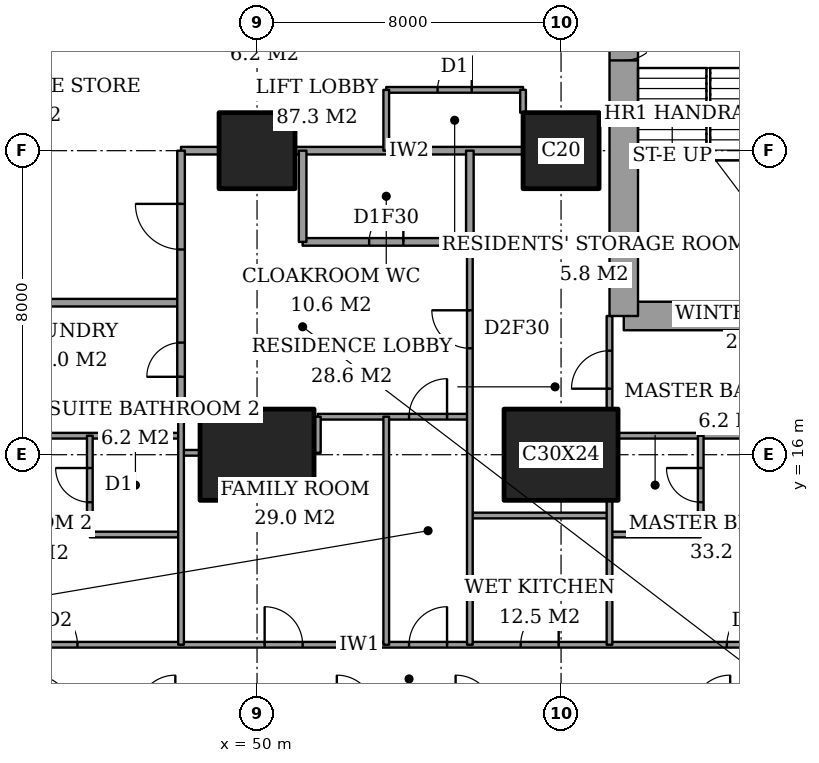
"""IFC4 building model, lengths in metres.
Left out: names, types, materials, properties, quantities, classifications, styles, units other than length and angle.
Written with IfcOpenShell. Run it as: python <this file> out.ifc"""

import sys

from ifc_helpers import new_model, si_unit, direction, frame, frame_2d, origin, origin_2d, place, context, subcontext, project, spatial, rectangle, extrude, element, fill, save


model = new_model("IFC4")
c1 = context("Model", 3, precision=1e-05, world=origin(), true_north=direction((0.0, 1.0)))
c2 = subcontext(c1, "Body", "Model", "MODEL_VIEW")
j1 = project(units=[si_unit("LENGTHUNIT", "METRE"), si_unit("PLANEANGLEUNIT", "RADIAN")], contexts=[c1])
p1 = place(None, origin())
s1 = spatial("IfcSite", under=j1, at=p1, CompositionType="ELEMENT")
p2 = place(p1, origin())
s2 = spatial("IfcBuilding", under=s1, at=p2, CompositionType="ELEMENT")
p3 = place(p2, frame((0.0, 0.0, 117.8)))
s3 = spatial("IfcBuildingStorey", under=s2, at=p3, CompositionType="ELEMENT", Elevation=117.8)
p4 = place(p3, frame((50.0, 16.0, 0.0), z_axis=(0.0, 0.0, 1.0), x_axis=(1.0, 0.0, 0.0)))
e1 = element("IfcColumn", 1, at=p4, inside=s3, PredefinedType="COLUMN", context=c2, shape_type="SweptSolid", body=[
    extrude(rectangle(XDim=3.0, YDim=2.4, at=origin_2d()), origin(), (0.0, 0.0, 1.0), 3.6),
])
p5 = place(p3, frame((50.0, 24.0, 0.0), z_axis=(0.0, 0.0, 1.0), x_axis=(1.0, 0.0, 0.0)))
e2 = element("IfcColumn", 2, at=p5, inside=s3, PredefinedType="COLUMN", context=c2, shape_type="SweptSolid", body=[
    extrude(rectangle(XDim=2.0, YDim=2.0, at=origin_2d()), origin(), (0.0, 0.0, 1.0), 3.6),
])
p6 = place(p3, frame((58.0, 16.0, 0.0), z_axis=(0.0, 0.0, 1.0), x_axis=(1.0, 0.0, 0.0)))
e3 = element("IfcColumn", 3, at=p6, inside=s3, PredefinedType="COLUMN", context=c2, shape_type="SweptSolid", body=[
    extrude(rectangle(XDim=3.0, YDim=2.4, at=origin_2d()), origin(), (0.0, 0.0, 1.0), 3.6),
])
p7 = place(p3, frame((58.0, 24.0, 0.0), z_axis=(0.0, 0.0, 1.0), x_axis=(1.0, 0.0, 0.0)))
e4 = element("IfcColumn", 4, at=p7, inside=s3, PredefinedType="COLUMN", context=c2, shape_type="SweptSolid", body=[
    extrude(rectangle(XDim=2.0, YDim=2.0, at=origin_2d()), origin(), (0.0, 0.0, 1.0), 3.6),
])
p8 = place(p3, frame((59.65, 19.65, 0.0), z_axis=(0.0, 0.0, 1.0), x_axis=(1.0, 0.0, 0.0)))
e5 = element("IfcWall", 5, at=p8, inside=s3, PredefinedType="SHEAR", context=c2, shape_type="SweptSolid", body=[
    extrude(rectangle(XDim=4.45, YDim=0.75, at=frame_2d((2.225, 0.0))), origin(), (0.0, 0.0, 1.0), 3.6),
])
p9 = place(p3, frame((59.65, 28.35, 0.0), z_axis=(0.0, 0.0, 1.0), x_axis=(0.0, -1.0, 0.0)))
e6 = element("IfcWall", 6, at=p9, inside=s3, PredefinedType="SHEAR", context=c2, shape_type="SweptSolid", body=[
    extrude(rectangle(XDim=8.7, YDim=0.75, at=frame_2d((4.35, 0.0))), origin(), (0.0, 0.0, 1.0), 3.6),
])
p10 = place(p9, frame((0.975, 0.0, 0.0)))
e7 = element("IfcOpeningElement", 7, at=p10, cuts=e6, PredefinedType="OPENING", context=c2, shape_type="SweptSolid", body=[
    extrude(rectangle(XDim=1.0, YDim=2.1, at=frame_2d((0.5, 1.05))), frame((0.0, 0.385, 0.0), z_axis=(0.0, -1.0, 0.0), x_axis=(1.0, 0.0, 0.0)), (0.0, 0.0, 1.0), 0.77),
])
p11 = place(p3, frame((41.439, 11.0, 0.0), z_axis=(0.0, 0.0, 1.0), x_axis=(1.0, 0.0, 0.0)))
e8 = element("IfcWall", 8, at=p11, inside=s3, PredefinedType="PARTITIONING", context=c2, shape_type="SweptSolid", body=[
    extrude(rectangle(XDim=25.011, YDim=0.15, at=frame_2d((12.505, 0.0))), origin(), (0.0, 0.0, 1.0), 3.35),
])
p12 = place(p11, frame((12.561, 0.0, 0.0)))
e9 = element("IfcOpeningElement", 9, at=p12, cuts=e8, PredefinedType="OPENING", context=c2, shape_type="SweptSolid", body=[
    extrude(rectangle(XDim=1.0, YDim=2.1, at=frame_2d((0.5, 1.05))), frame((0.0, 0.085, 0.0), z_axis=(0.0, -1.0, 0.0), x_axis=(1.0, 0.0, 0.0)), (0.0, 0.0, 1.0), 0.17),
])
p13 = place(p11, frame((20.924, 0.0, 0.0)))
e10 = element("IfcOpeningElement", 10, at=p13, cuts=e8, PredefinedType="OPENING", context=c2, shape_type="SweptSolid", body=[
    extrude(rectangle(XDim=1.0, YDim=2.1, at=frame_2d((0.5, 1.05))), frame((0.0, 0.085, 0.0), z_axis=(0.0, -1.0, 0.0), x_axis=(1.0, 0.0, 0.0)), (0.0, 0.0, 1.0), 0.17),
])
p14 = place(p11, frame((15.499, 0.0, 0.0)))
e11 = element("IfcOpeningElement", 11, at=p14, cuts=e8, PredefinedType="OPENING", context=c2, shape_type="SweptSolid", body=[
    extrude(rectangle(XDim=1.0, YDim=2.1, at=frame_2d((0.5, 1.05))), frame((0.0, 0.085, 0.0), z_axis=(0.0, -1.0, 0.0), x_axis=(1.0, 0.0, 0.0)), (0.0, 0.0, 1.0), 0.17),
])
p15 = place(p11, frame((8.761, 0.0, 0.0)))
e12 = element("IfcOpeningElement", 12, at=p15, cuts=e8, PredefinedType="OPENING", context=c2, shape_type="SweptSolid", body=[
    extrude(rectangle(XDim=1.0, YDim=2.1, at=frame_2d((0.5, 1.05))), frame((0.0, 0.085, 0.0), z_axis=(0.0, -1.0, 0.0), x_axis=(1.0, 0.0, 0.0)), (0.0, 0.0, 1.0), 0.17),
])
p16 = place(p11, frame((2.836, 0.0, 0.0)))
e13 = element("IfcOpeningElement", 13, at=p16, cuts=e8, PredefinedType="OPENING", context=c2, shape_type="SweptSolid", body=[
    extrude(rectangle(XDim=1.0, YDim=2.1, at=frame_2d((0.5, 1.05))), frame((0.0, 0.085, 0.0), z_axis=(0.0, -1.0, 0.0), x_axis=(1.0, 0.0, 0.0)), (0.0, 0.0, 1.0), 0.17),
])
p17 = place(p3, frame((45.6, 13.9, 0.0), z_axis=(0.0, 0.0, 1.0), x_axis=(1.0, 0.0, 0.0)))
e14 = element("IfcWall", 14, at=p17, inside=s3, PredefinedType="PARTITIONING", context=c2, shape_type="SweptSolid", body=[
    extrude(rectangle(XDim=2.4, YDim=0.15, at=frame_2d((1.2, 0.0))), origin(), (0.0, 0.0, 1.0), 3.35),
])
p18 = place(p3, frame((59.275, 13.9, 0.0), z_axis=(0.0, 0.0, 1.0), x_axis=(1.0, 0.0, 0.0)))
e15 = element("IfcWall", 15, at=p18, inside=s3, PredefinedType="PARTITIONING", context=c2, shape_type="SweptSolid", body=[
    extrude(rectangle(XDim=2.4, YDim=0.15, at=frame_2d((1.2, 0.0))), origin(), (0.0, 0.0, 1.0), 3.35),
])
p19 = place(p3, frame((55.6, 14.4, 0.0), z_axis=(0.0, 0.0, 1.0), x_axis=(1.0, 0.0, 0.0)))
e16 = element("IfcWall", 16, at=p19, inside=s3, PredefinedType="PARTITIONING", context=c2, shape_type="SweptSolid", body=[
    extrude(rectangle(XDim=3.675, YDim=0.15, at=frame_2d((1.837, 0.0))), origin(), (0.0, 0.0, 1.0), 3.35),
])
p20 = place(p3, frame((48.0, 16.05, 0.0), z_axis=(0.0, 0.0, 1.0), x_axis=(1.0, 0.0, 0.0)))
e17 = element("IfcWall", 17, at=p20, inside=s3, PredefinedType="PARTITIONING", context=c2, shape_type="SweptSolid", body=[
    extrude(rectangle(XDim=0.5, YDim=0.15, at=frame_2d((0.25, 0.0))), origin(), (0.0, 0.0, 1.0), 2.634),
])
p21 = place(p3, frame((42.0, 16.5, 0.0), z_axis=(0.0, 0.0, 1.0), x_axis=(1.0, 0.0, 0.0)))
e18 = element("IfcWall", 18, at=p21, inside=s3, PredefinedType="PARTITIONING", context=c2, shape_type="SweptSolid", body=[
    extrude(rectangle(XDim=6.0, YDim=0.15, at=frame_2d((3.0, 0.0))), origin(), (0.0, 0.0, 1.0), 3.35),
])
p22 = place(p3, frame((59.5, 16.5, 0.0), z_axis=(0.0, 0.0, 1.0), x_axis=(1.0, 0.0, 0.0)))
e19 = element("IfcWall", 19, at=p22, inside=s3, PredefinedType="PARTITIONING", context=c2, shape_type="SweptSolid", body=[
    extrude(rectangle(XDim=5.15, YDim=0.15, at=frame_2d((2.575, 0.0))), origin(), (0.0, 0.0, 1.0), 3.35),
])
p23 = place(p3, frame((51.6, 17.0, 0.0), z_axis=(0.0, 0.0, 1.0), x_axis=(1.0, 0.0, 0.0)))
e20 = element("IfcWall", 20, at=p23, inside=s3, PredefinedType="PARTITIONING", context=c2, shape_type="SweptSolid", body=[
    extrude(rectangle(XDim=4.0, YDim=0.15, at=frame_2d((2.0, 0.0))), origin(), (0.0, 0.0, 1.0), 3.35),
])
p24 = place(p23, frame((2.4, 0.0, 0.0)))
e21 = element("IfcOpeningElement", 21, at=p24, cuts=e20, PredefinedType="OPENING", context=c2, shape_type="SweptSolid", body=[
    extrude(rectangle(XDim=1.0, YDim=2.1, at=frame_2d((0.5, 1.05))), frame((0.0, 0.085, 0.0), z_axis=(0.0, -1.0, 0.0), x_axis=(1.0, 0.0, 0.0)), (0.0, 0.0, 1.0), 0.17),
])
p25 = place(p3, frame((42.0, 20.0, 0.0), z_axis=(0.0, 0.0, 1.0), x_axis=(1.0, 0.0, 0.0)))
e22 = element("IfcWall", 22, at=p25, inside=s3, PredefinedType="PARTITIONING", context=c2, shape_type="SweptSolid", body=[
    extrude(rectangle(XDim=6.0, YDim=0.2, at=frame_2d((3.0, 0.0))), origin(), (0.0, 0.0, 1.0), 3.35),
])
p26 = place(p3, frame((51.2, 21.6, 0.0), z_axis=(0.0, 0.0, 1.0), x_axis=(1.0, 0.0, 0.0)))
e23 = element("IfcWall", 23, at=p26, inside=s3, PredefinedType="PARTITIONING", context=c2, shape_type="SweptSolid", body=[
    extrude(rectangle(XDim=4.4, YDim=0.2, at=frame_2d((2.2, 0.0))), origin(), (0.0, 0.0, 1.0), 3.35),
])
p27 = place(p26, frame((1.75, 0.0, 0.0)))
e24 = element("IfcOpeningElement", 24, at=p27, cuts=e23, PredefinedType="OPENING", context=c2, shape_type="SweptSolid", body=[
    extrude(rectangle(XDim=0.9, YDim=2.1, at=frame_2d((0.45, 1.05))), frame((0.0, 0.11, 0.0), z_axis=(0.0, -1.0, 0.0), x_axis=(1.0, 0.0, 0.0)), (0.0, 0.0, 1.0), 0.22),
])
p28 = place(p3, frame((48.0, 24.0, 0.0), z_axis=(0.0, 0.0, 1.0), x_axis=(1.0, 0.0, 0.0)))
e25 = element("IfcWall", 25, at=p28, inside=s3, PredefinedType="PARTITIONING", context=c2, shape_type="SweptSolid", body=[
    extrude(rectangle(XDim=1.0, YDim=0.2, at=frame_2d((0.5, 0.0))), origin(), (0.0, 0.0, 1.0), 3.35),
])
p29 = place(p3, frame((51.0, 24.0, 0.0), z_axis=(0.0, 0.0, 1.0), x_axis=(1.0, 0.0, 0.0)))
e26 = element("IfcWall", 26, at=p29, inside=s3, PredefinedType="PARTITIONING", context=c2, shape_type="SweptSolid", body=[
    extrude(rectangle(XDim=6.0, YDim=0.2, at=frame_2d((3.0, 0.0))), origin(), (0.0, 0.0, 1.0), 3.35),
])
p30 = place(p3, frame((53.4, 25.6, 0.0), z_axis=(0.0, 0.0, 1.0), x_axis=(1.0, 0.0, 0.0)))
e27 = element("IfcWall", 27, at=p30, inside=s3, PredefinedType="PARTITIONING", context=c2, shape_type="SweptSolid", body=[
    extrude(rectangle(XDim=3.6, YDim=0.15, at=frame_2d((1.8, 0.0))), origin(), (0.0, 0.0, 1.0), 3.35),
])
p31 = place(p30, frame((1.35, 0.0, 0.0)))
e28 = element("IfcOpeningElement", 28, at=p31, cuts=e27, PredefinedType="OPENING", context=c2, shape_type="SweptSolid", body=[
    extrude(rectangle(XDim=0.9, YDim=2.1, at=frame_2d((0.45, 1.05))), frame((0.0, 0.085, 0.0), z_axis=(0.0, -1.0, 0.0), x_axis=(1.0, 0.0, 0.0)), (0.0, 0.0, 1.0), 0.17),
])
p32 = place(p3, frame((45.6, 13.9, 0.0), z_axis=(0.0, 0.0, 1.0), x_axis=(0.0, 1.0, 0.0)))
e29 = element("IfcWall", 29, at=p32, inside=s3, PredefinedType="PARTITIONING", context=c2, shape_type="SweptSolid", body=[
    extrude(rectangle(XDim=2.6, YDim=0.15, at=frame_2d((1.3, 0.0))), origin(), (0.0, 0.0, 1.0), 3.35),
])
p33 = place(p32, frame((0.85, 0.0, 0.0)))
e30 = element("IfcOpeningElement", 30, at=p33, cuts=e29, PredefinedType="OPENING", context=c2, shape_type="SweptSolid", body=[
    extrude(rectangle(XDim=0.9, YDim=2.1, at=frame_2d((0.45, 1.05))), frame((0.0, 0.085, 0.0), z_axis=(0.0, -1.0, 0.0), x_axis=(1.0, 0.0, 0.0)), (0.0, 0.0, 1.0), 0.17),
])
p34 = place(p3, frame((48.0, 17.0, 0.0), z_axis=(0.0, 0.0, 1.0), x_axis=(0.0, 1.0, 0.0)))
e31 = element("IfcWall", 31, at=p34, inside=s3, PredefinedType="PARTITIONING", context=c2, shape_type="SweptSolid", body=[
    extrude(rectangle(XDim=7.0, YDim=0.2, at=frame_2d((3.5, 0.0))), origin(), (0.0, 0.0, 1.0), 3.35),
])
p35 = place(p34, frame((4.4, 0.0, 0.0)))
e32 = element("IfcOpeningElement", 32, at=p35, cuts=e31, PredefinedType="OPENING", context=c2, shape_type="SweptSolid", body=[
    extrude(rectangle(XDim=1.2, YDim=2.4, at=frame_2d((0.6, 1.2))), frame((0.0, 0.11, 0.0), z_axis=(0.0, -1.0, 0.0), x_axis=(1.0, 0.0, 0.0)), (0.0, 0.0, 1.0), 0.22),
])
p36 = place(p34, frame((1.05, 0.0, 0.0)))
e33 = element("IfcOpeningElement", 33, at=p36, cuts=e31, PredefinedType="OPENING", context=c2, shape_type="SweptSolid", body=[
    extrude(rectangle(XDim=0.9, YDim=2.1, at=frame_2d((0.45, 1.05))), frame((0.0, 0.11, 0.0), z_axis=(0.0, -1.0, 0.0), x_axis=(1.0, 0.0, 0.0)), (0.0, 0.0, 1.0), 0.22),
])
p37 = place(p3, frame((48.0, 11.0, 0.0), z_axis=(0.0, 0.0, 1.0), x_axis=(0.0, 1.0, 0.0)))
e34 = element("IfcWall", 34, at=p37, inside=s3, PredefinedType="PARTITIONING", context=c2, shape_type="SweptSolid", body=[
    extrude(rectangle(XDim=6.0, YDim=0.15, at=frame_2d((3.0, 0.0))), origin(), (0.0, 0.0, 1.0), 3.35),
])
p38 = place(p3, frame((51.2, 21.6, 0.0), z_axis=(0.0, 0.0, 1.0), x_axis=(0.0, 1.0, 0.0)))
e35 = element("IfcWall", 35, at=p38, inside=s3, PredefinedType="PARTITIONING", context=c2, shape_type="SweptSolid", body=[
    extrude(rectangle(XDim=2.4, YDim=0.2, at=frame_2d((1.2, 0.0))), origin(), (0.0, 0.0, 1.0), 3.35),
])
p39 = place(p3, frame((51.6, 16.05, 0.0), z_axis=(0.0, 0.0, 1.0), x_axis=(0.0, 1.0, 0.0)))
e36 = element("IfcWall", 36, at=p39, inside=s3, PredefinedType="PARTITIONING", context=c2, shape_type="SweptSolid", body=[
    extrude(rectangle(XDim=0.95, YDim=0.15, at=frame_2d((0.475, 0.0))), origin(), (0.0, 0.0, 1.0), 3.35),
])
p40 = place(p3, frame((53.4, 11.0, 0.0), z_axis=(0.0, 0.0, 1.0), x_axis=(0.0, 1.0, 0.0)))
e37 = element("IfcWall", 37, at=p40, inside=s3, PredefinedType="PARTITIONING", context=c2, shape_type="SweptSolid", body=[
    extrude(rectangle(XDim=6.0, YDim=0.15, at=frame_2d((3.0, 0.0))), origin(), (0.0, 0.0, 1.0), 3.35),
])
p41 = place(p3, frame((53.4, 24.0, 0.0), z_axis=(0.0, 0.0, 1.0), x_axis=(0.0, 1.0, 0.0)))
e38 = element("IfcWall", 38, at=p41, inside=s3, PredefinedType="PARTITIONING", context=c2, shape_type="SweptSolid", body=[
    extrude(rectangle(XDim=1.6, YDim=0.15, at=frame_2d((0.8, 0.0))), origin(), (0.0, 0.0, 1.0), 3.35),
])
p42 = place(p3, frame((55.6, 21.6, 0.0), z_axis=(0.0, 0.0, 1.0), x_axis=(0.0, 1.0, 0.0)))
e39 = element("IfcWall", 39, at=p42, inside=s3, PredefinedType="PARTITIONING", context=c2, shape_type="SweptSolid", body=[
    extrude(rectangle(XDim=2.4, YDim=0.2, at=frame_2d((1.2, 0.0))), origin(), (0.0, 0.0, 1.0), 3.35),
])
p43 = place(p3, frame((55.6, 11.0, 0.0), z_axis=(0.0, 0.0, 1.0), x_axis=(0.0, 1.0, 0.0)))
e40 = element("IfcWall", 40, at=p43, inside=s3, PredefinedType="PARTITIONING", context=c2, shape_type="SweptSolid", body=[
    extrude(rectangle(XDim=10.6, YDim=0.15, at=frame_2d((5.3, 0.0))), origin(), (0.0, 0.0, 1.0), 3.35),
])
p44 = place(p43, frame((7.8, 0.0, 0.0)))
e41 = element("IfcOpeningElement", 41, at=p44, cuts=e40, PredefinedType="OPENING", context=c2, shape_type="SweptSolid", body=[
    extrude(rectangle(XDim=1.0, YDim=2.1, at=frame_2d((0.5, 1.05))), frame((0.0, 0.085, 0.0), z_axis=(0.0, -1.0, 0.0), x_axis=(1.0, 0.0, 0.0)), (0.0, 0.0, 1.0), 0.17),
])
p45 = place(p3, frame((57.0, 25.0, 0.0), z_axis=(0.0, 0.0, 1.0), x_axis=(0.0, 1.0, 0.0)))
e42 = element("IfcWall", 42, at=p45, inside=s3, PredefinedType="PARTITIONING", context=c2, shape_type="SweptSolid", body=[
    extrude(rectangle(XDim=0.6, YDim=0.15, at=frame_2d((0.3, 0.0))), origin(), (0.0, 0.0, 1.0), 3.35),
])
p46 = place(p3, frame((59.275, 11.0, 0.0), z_axis=(0.0, 0.0, 1.0), x_axis=(0.0, 1.0, 0.0)))
e43 = element("IfcWall", 43, at=p46, inside=s3, PredefinedType="PARTITIONING", context=c2, shape_type="SweptSolid", body=[
    extrude(rectangle(XDim=3.8, YDim=0.15, at=frame_2d((1.9, 0.0))), origin(), (0.0, 0.0, 1.0), 3.35),
])
p47 = place(p3, frame((59.275, 17.2, 0.0), z_axis=(0.0, 0.0, 1.0), x_axis=(0.0, 1.0, 0.0)))
e44 = element("IfcWall", 44, at=p47, inside=s3, PredefinedType="PARTITIONING", context=c2, shape_type="SweptSolid", body=[
    extrude(rectangle(XDim=2.45, YDim=0.15, at=frame_2d((1.225, 0.0))), origin(), (0.0, 0.0, 1.0), 3.35),
])
p48 = place(p47, frame((0.538, 0.0, 0.0)))
e45 = element("IfcOpeningElement", 45, at=p48, cuts=e44, PredefinedType="OPENING", context=c2, shape_type="SweptSolid", body=[
    extrude(rectangle(XDim=1.0, YDim=2.1, at=frame_2d((0.5, 1.05))), frame((0.0, 0.085, 0.0), z_axis=(0.0, -1.0, 0.0), x_axis=(1.0, 0.0, 0.0)), (0.0, 0.0, 1.0), 0.17),
])
p49 = place(p3, frame((61.675, 13.9, 0.0), z_axis=(0.0, 0.0, 1.0), x_axis=(0.0, 1.0, 0.0)))
e46 = element("IfcWall", 46, at=p49, inside=s3, PredefinedType="PARTITIONING", context=c2, shape_type="SweptSolid", body=[
    extrude(rectangle(XDim=2.6, YDim=0.15, at=frame_2d((1.3, 0.0))), origin(), (0.0, 0.0, 1.0), 3.35),
])
p50 = place(p49, frame((0.85, 0.0, 0.0)))
e47 = element("IfcOpeningElement", 47, at=p50, cuts=e46, PredefinedType="OPENING", context=c2, shape_type="SweptSolid", body=[
    extrude(rectangle(XDim=0.9, YDim=2.1, at=frame_2d((0.45, 1.05))), frame((0.0, 0.085, 0.0), z_axis=(0.0, -1.0, 0.0), x_axis=(1.0, 0.0, 0.0)), (0.0, 0.0, 1.0), 0.17),
])
p51 = place(p12, origin())
e48 = element("IfcDoor", 48, at=p51, inside=s3, OperationType="SINGLE_SWING_LEFT", PredefinedType="DOOR", context=c2, shape_type="SweptSolid", body=[
    extrude(rectangle(XDim=1.0, YDim=2.1, at=frame_2d((0.5, 1.05))), frame((0.0, 0.025, 0.0), z_axis=(0.0, -1.0, 0.0), x_axis=(1.0, 0.0, 0.0)), (0.0, 0.0, 1.0), 0.05),
])
fill(e9, e48)
p52 = place(p50, origin())
e49 = element("IfcDoor", 49, at=p52, inside=s3, OperationType="SINGLE_SWING_LEFT", PredefinedType="DOOR", context=c2, shape_type="SweptSolid", body=[
    extrude(rectangle(XDim=0.9, YDim=2.1, at=frame_2d((0.45, 1.05))), frame((0.0, 0.025, 0.0), z_axis=(0.0, -1.0, 0.0), x_axis=(1.0, 0.0, 0.0)), (0.0, 0.0, 1.0), 0.05),
])
fill(e47, e49)
p53 = place(p13, origin())
e50 = element("IfcDoor", 50, at=p53, inside=s3, OperationType="SINGLE_SWING_LEFT", PredefinedType="DOOR", context=c2, shape_type="SweptSolid", body=[
    extrude(rectangle(XDim=1.0, YDim=2.1, at=frame_2d((0.5, 1.05))), frame((0.0, 0.025, 0.0), z_axis=(0.0, -1.0, 0.0), x_axis=(1.0, 0.0, 0.0)), (0.0, 0.0, 1.0), 0.05),
])
fill(e10, e50)
p54 = place(p48, origin())
e51 = element("IfcDoor", 51, at=p54, inside=s3, OperationType="SINGLE_SWING_RIGHT", PredefinedType="DOOR", context=c2, shape_type="SweptSolid", body=[
    extrude(rectangle(XDim=1.0, YDim=2.1, at=frame_2d((0.5, 1.05))), frame((0.0, 0.025, 0.0), z_axis=(0.0, -1.0, 0.0), x_axis=(1.0, 0.0, 0.0)), (0.0, 0.0, 1.0), 0.05),
])
fill(e45, e51)
p55 = place(p14, origin())
e52 = element("IfcDoor", 52, at=p55, inside=s3, OperationType="SINGLE_SWING_LEFT", PredefinedType="DOOR", context=c2, shape_type="SweptSolid", body=[
    extrude(rectangle(XDim=1.0, YDim=2.1, at=frame_2d((0.5, 1.05))), frame((0.0, 0.025, 0.0), z_axis=(0.0, -1.0, 0.0), x_axis=(1.0, 0.0, 0.0)), (0.0, 0.0, 1.0), 0.05),
])
fill(e11, e52)
p56 = place(p44, origin())
e53 = element("IfcDoor", 53, at=p56, inside=s3, OperationType="SINGLE_SWING_LEFT", PredefinedType="DOOR", context=c2, shape_type="SweptSolid", body=[
    extrude(rectangle(XDim=1.0, YDim=2.1, at=frame_2d((0.5, 1.05))), frame((0.0, 0.025, 0.0), z_axis=(0.0, -1.0, 0.0), x_axis=(1.0, 0.0, 0.0)), (0.0, 0.0, 1.0), 0.05),
])
fill(e41, e53)
p57 = place(p27, origin())
e54 = element("IfcDoor", 54, at=p57, inside=s3, OperationType="SINGLE_SWING_LEFT", PredefinedType="DOOR", context=c2, shape_type="SweptSolid", body=[
    extrude(rectangle(XDim=0.9, YDim=2.1, at=frame_2d((0.45, 1.05))), frame((0.0, 0.025, 0.0), z_axis=(0.0, -1.0, 0.0), x_axis=(1.0, 0.0, 0.0)), (0.0, 0.0, 1.0), 0.05),
])
fill(e24, e54)
p58 = place(p35, origin())
e55 = element("IfcDoor", 55, at=p58, inside=s3, OperationType="SINGLE_SWING_LEFT", PredefinedType="DOOR", context=c2, shape_type="SweptSolid", body=[
    extrude(rectangle(XDim=1.2, YDim=2.4, at=frame_2d((0.6, 1.2))), frame((0.0, 0.025, 0.0), z_axis=(0.0, -1.0, 0.0), x_axis=(1.0, 0.0, 0.0)), (0.0, 0.0, 1.0), 0.05),
])
fill(e32, e55)
p59 = place(p24, origin())
e56 = element("IfcDoor", 56, at=p59, inside=s3, OperationType="SINGLE_SWING_LEFT", PredefinedType="DOOR", context=c2, shape_type="SweptSolid", body=[
    extrude(rectangle(XDim=1.0, YDim=2.1, at=frame_2d((0.5, 1.05))), frame((0.0, 0.025, 0.0), z_axis=(0.0, -1.0, 0.0), x_axis=(1.0, 0.0, 0.0)), (0.0, 0.0, 1.0), 0.05),
])
fill(e21, e56)
p60 = place(p15, origin())
e57 = element("IfcDoor", 57, at=p60, inside=s3, OperationType="SINGLE_SWING_RIGHT", PredefinedType="DOOR", context=c2, shape_type="SweptSolid", body=[
    extrude(rectangle(XDim=1.0, YDim=2.1, at=frame_2d((0.5, 1.05))), frame((0.0, 0.025, 0.0), z_axis=(0.0, -1.0, 0.0), x_axis=(1.0, 0.0, 0.0)), (0.0, 0.0, 1.0), 0.05),
])
fill(e12, e57)
p61 = place(p33, origin())
e58 = element("IfcDoor", 58, at=p61, inside=s3, OperationType="SINGLE_SWING_LEFT", PredefinedType="DOOR", context=c2, shape_type="SweptSolid", body=[
    extrude(rectangle(XDim=0.9, YDim=2.1, at=frame_2d((0.45, 1.05))), frame((0.0, 0.025, 0.0), z_axis=(0.0, -1.0, 0.0), x_axis=(1.0, 0.0, 0.0)), (0.0, 0.0, 1.0), 0.05),
])
fill(e30, e58)
p62 = place(p16, origin())
e59 = element("IfcDoor", 59, at=p62, inside=s3, OperationType="SINGLE_SWING_RIGHT", PredefinedType="DOOR", context=c2, shape_type="SweptSolid", body=[
    extrude(rectangle(XDim=1.0, YDim=2.1, at=frame_2d((0.5, 1.05))), frame((0.0, 0.025, 0.0), z_axis=(0.0, -1.0, 0.0), x_axis=(1.0, 0.0, 0.0)), (0.0, 0.0, 1.0), 0.05),
])
fill(e13, e59)
p63 = place(p36, origin())
e60 = element("IfcDoor", 60, at=p63, inside=s3, OperationType="SINGLE_SWING_RIGHT", PredefinedType="DOOR", context=c2, shape_type="SweptSolid", body=[
    extrude(rectangle(XDim=0.9, YDim=2.1, at=frame_2d((0.45, 1.05))), frame((0.0, 0.025, 0.0), z_axis=(0.0, -1.0, 0.0), x_axis=(1.0, 0.0, 0.0)), (0.0, 0.0, 1.0), 0.05),
])
fill(e33, e60)
p64 = place(p31, origin())
e61 = element("IfcDoor", 61, at=p64, inside=s3, OperationType="SINGLE_SWING_LEFT", PredefinedType="DOOR", context=c2, shape_type="SweptSolid", body=[
    extrude(rectangle(XDim=0.9, YDim=2.1, at=frame_2d((0.45, 1.05))), frame((0.0, 0.025, 0.0), z_axis=(0.0, -1.0, 0.0), x_axis=(1.0, 0.0, 0.0)), (0.0, 0.0, 1.0), 0.05),
])
fill(e28, e61)
p65 = place(p10, origin())
e62 = element("IfcDoor", 62, at=p65, inside=s3, OperationType="SINGLE_SWING_RIGHT", PredefinedType="DOOR", context=c2, shape_type="SweptSolid", body=[
    extrude(rectangle(XDim=1.0, YDim=2.1, at=frame_2d((0.5, 1.05))), frame((0.0, 0.025, 0.0), z_axis=(0.0, -1.0, 0.0), x_axis=(1.0, 0.0, 0.0)), (0.0, 0.0, 1.0), 0.05),
])
fill(e7, e62)
save(model, sys.argv[1])
